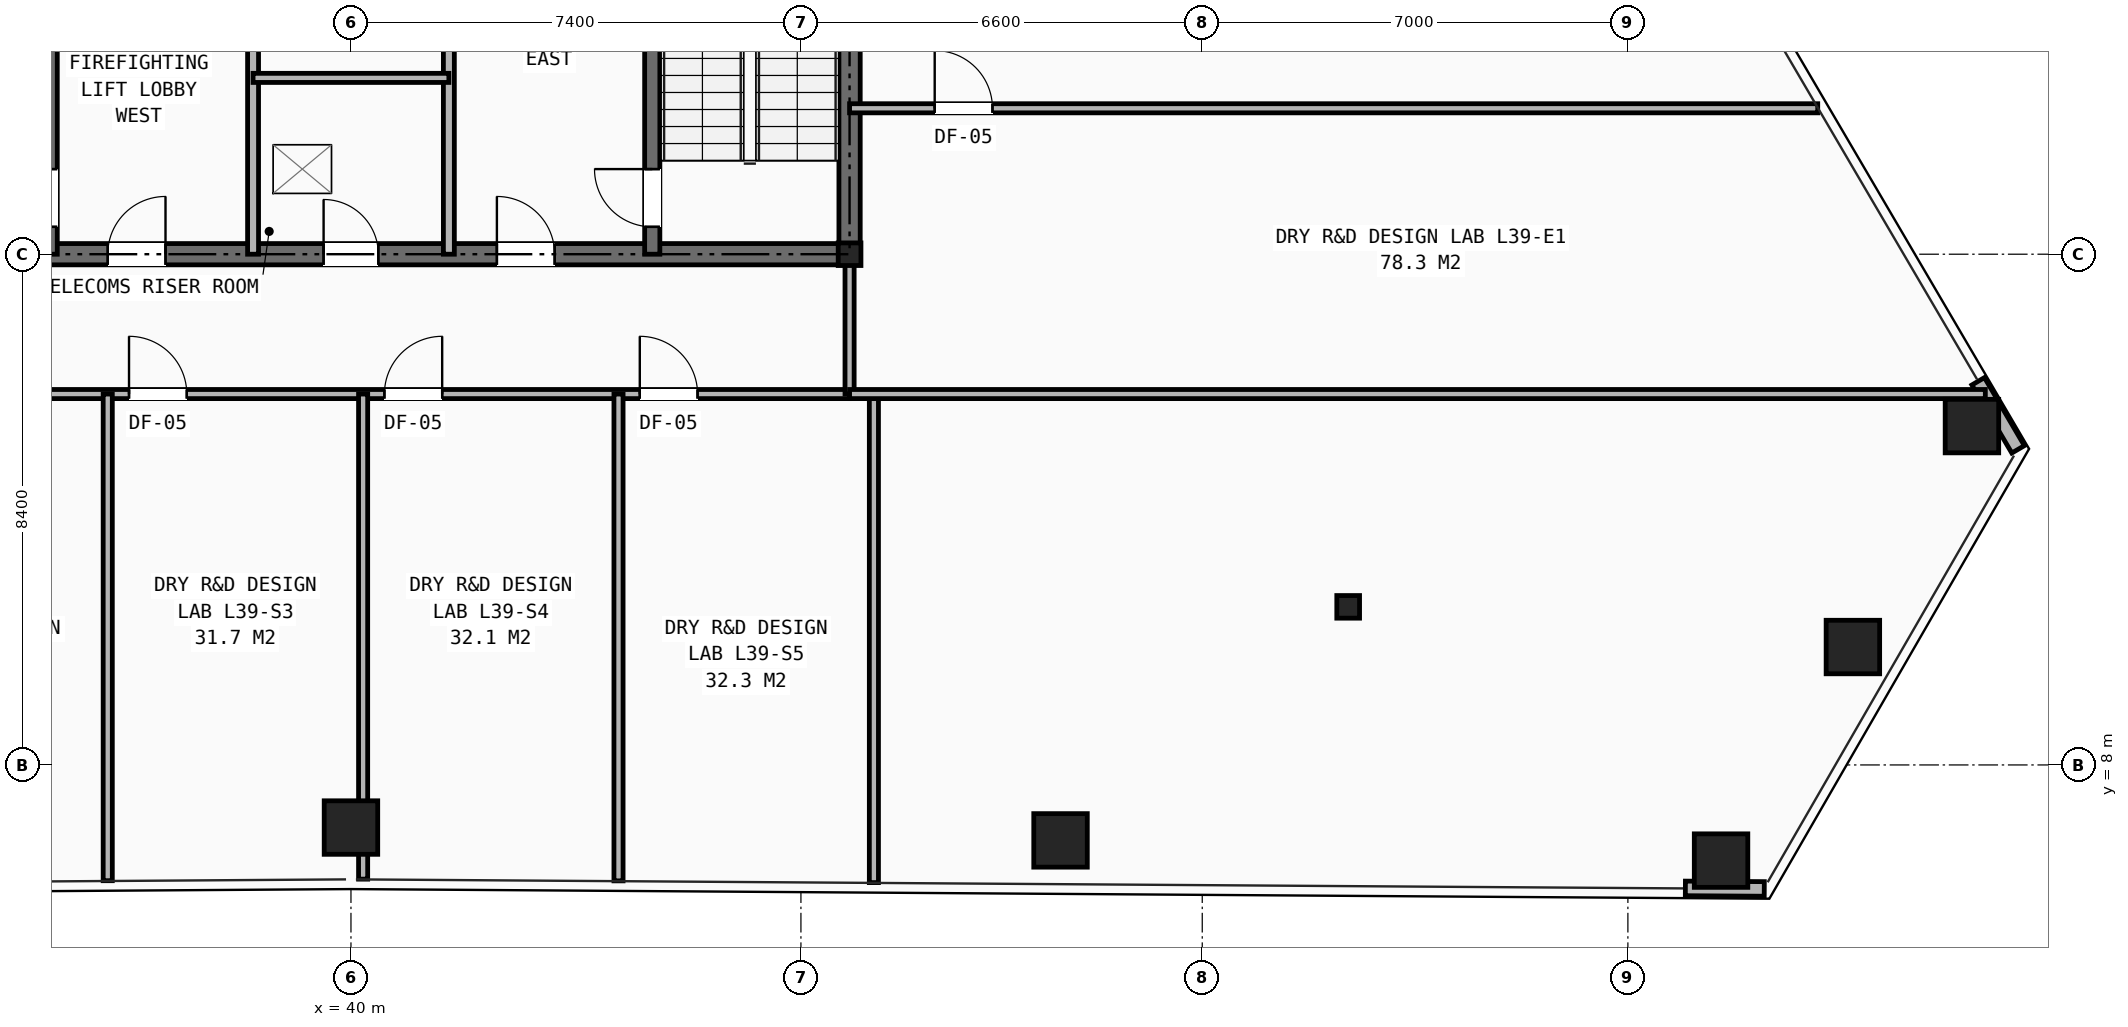
"""IFC4 building model, lengths in metres.
Left out: names, types, materials, properties, quantities, classifications, styles, units other than length and angle.
Written with IfcOpenShell. Run it as: python <this file> out.ifc"""

import sys

from ifc_helpers import new_model, si_unit, direction, frame, frame_2d, origin, origin_2d, place, context, subcontext, project, spatial, rectangle, hollow_rectangle, i_section, extrude, element, fill, save


model = new_model("IFC4")
c1 = context("Model", 3, precision=1e-05, world=origin(), true_north=direction((0.0, 1.0)))
c2 = subcontext(c1, "Body", "Model", "MODEL_VIEW")
j1 = project(units=[si_unit("LENGTHUNIT", "METRE"), si_unit("PLANEANGLEUNIT", "RADIAN")], contexts=[c1])
p1 = place(None, origin())
s1 = spatial("IfcSite", under=j1, at=p1, CompositionType="ELEMENT")
p2 = place(p1, origin())
s2 = spatial("IfcBuilding", under=s1, at=p2, CompositionType="ELEMENT")
p3 = place(p2, frame((0.0, 0.0, 136.7)))
s3 = spatial("IfcBuildingStorey", under=s2, at=p3, CompositionType="ELEMENT", Elevation=136.7)
for number, where, z_axis, x_axis in (
    (1, (48.2, 16.4, 0.0), (0.0, 0.0, 1.0), (1.0, 0.0, 0.0)),
    (2, (56.4, 10.6, 0.0), (0.0, 0.0, 1.0), (1.0, 0.0, 0.0)),
):
    element("IfcColumn", number, at=place(p3, frame(where, z_axis=z_axis, x_axis=x_axis)), inside=s3, PredefinedType="COLUMN", context=c2, shape_type="SweptSolid", body=[
        extrude(i_section(OverallWidth=0.374, OverallDepth=0.372, WebThickness=0.016, FlangeThickness=0.026, at=origin_2d()), origin(), (0.0, 0.0, 1.0), 3.45),
    ])
for number, where, z_axis, x_axis in (
    (3, (40.0, 6.97, 0.0), (0.0, 0.0, 1.0), (1.0, 0.0, 0.0)),
    (4, (51.669, 6.759, 0.0), (0.0, 0.0, 1.0), (1.0, 0.0, 0.0)),
    (5, (62.532, 6.427, 0.0), (0.0, 0.0, 1.0), (1.0, 0.0, 0.0)),
    (6, (64.7, 9.939, 0.0), (0.0, 0.0, 1.0), (1.0, 0.0, 0.0)),
    (7, (66.658, 13.573, 0.0), (0.0, 0.0, 1.0), (1.0, 0.0, 0.0)),
):
    element("IfcColumn", number, at=place(p3, frame(where, z_axis=z_axis, x_axis=x_axis)), inside=s3, PredefinedType="COLUMN", context=c2, shape_type="SweptSolid", body=[
        extrude(hollow_rectangle(XDim=0.88, YDim=0.88, WallThickness=0.06, at=origin_2d()), origin(), (0.0, 0.0, 1.0), 3.45),
    ])
for number, where, z_axis, x_axis in (
    (8, (61.945, 5.969, 0.0), (0.0, 0.0, 1.0), (1.0, -0.007, 0.0)),
    (9, (67.417, 13.191, 0.0), (0.0, 0.0, 1.0), (-0.506, 0.863, 0.0)),
):
    element("IfcWall", number, at=place(p3, frame(where, z_axis=z_axis, x_axis=x_axis)), inside=s3, PredefinedType="SHEAR", context=c2, shape_type="SweptSolid", body=[
        extrude(rectangle(XDim=1.298, YDim=0.24, at=frame_2d((0.649, 0.0))), origin(), (0.0, 0.0, 1.0), 2.583),
    ])
p4 = place(p3, frame((31.8, 16.4, 0.0), z_axis=(0.0, 0.0, 1.0), x_axis=(1.0, 0.0, 0.0)))
e10 = element("IfcWall", 10, at=p4, inside=s3, PredefinedType="SHEAR", context=c2, shape_type="SweptSolid", body=[
    extrude(rectangle(XDim=16.4, YDim=0.35, at=frame_2d((8.2, 0.0))), origin(), (0.0, 0.0, 1.0), 3.21),
])
p5 = place(p4, frame((7.75, 0.0, 0.0)))
e11 = element("IfcOpeningElement", 11, at=p5, cuts=e10, PredefinedType="OPENING", context=c2, shape_type="SweptSolid", body=[
    extrude(rectangle(XDim=0.9, YDim=2.1, at=frame_2d((0.45, 1.05))), frame((0.0, 0.185, 0.0), z_axis=(0.0, -1.0, 0.0), x_axis=(1.0, 0.0, 0.0)), (0.0, 0.0, 1.0), 0.37),
])
p6 = place(p4, frame((4.2, 0.0, 0.0)))
e12 = element("IfcOpeningElement", 12, at=p6, cuts=e10, PredefinedType="OPENING", context=c2, shape_type="SweptSolid", body=[
    extrude(rectangle(XDim=0.95, YDim=2.1, at=frame_2d((0.475, 1.05))), frame((0.0, 0.185, 0.0), z_axis=(0.0, -1.0, 0.0), x_axis=(1.0, 0.0, 0.0)), (0.0, 0.0, 1.0), 0.37),
])
p7 = place(p4, frame((10.6, 0.0, 0.0)))
e13 = element("IfcOpeningElement", 13, at=p7, cuts=e10, PredefinedType="OPENING", context=c2, shape_type="SweptSolid", body=[
    extrude(rectangle(XDim=0.95, YDim=2.1, at=frame_2d((0.475, 1.05))), frame((0.0, 0.185, 0.0), z_axis=(0.0, -1.0, 0.0), x_axis=(1.0, 0.0, 0.0)), (0.0, 0.0, 1.0), 0.37),
])
p8 = place(p3, frame((48.2, 16.4, 0.0), z_axis=(0.0, 0.0, 1.0), x_axis=(0.0, 1.0, 0.0)))
e14 = element("IfcWall", 14, at=p8, inside=s3, PredefinedType="SHEAR", context=c2, shape_type="SweptSolid", body=[
    extrude(rectangle(XDim=14.8, YDim=0.35, at=frame_2d((7.4, 0.0))), origin(), (0.0, 0.0, 1.0), 3.21),
])
p9 = place(p8, frame((11.0, 0.0, 0.0)))
e15 = element("IfcOpeningElement", 15, at=p9, cuts=e14, PredefinedType="OPENING", context=c2, shape_type="SweptSolid", body=[
    extrude(rectangle(XDim=1.1, YDim=2.15, at=frame_2d((0.55, 1.075))), frame((0.0, 0.185, 0.0), z_axis=(0.0, -1.0, 0.0), x_axis=(1.0, 0.0, 0.0)), (0.0, 0.0, 1.0), 0.37),
])
p10 = place(p3, frame((35.045, 16.4, 0.0), z_axis=(0.0, 0.0, 1.0), x_axis=(0.0, 1.0, 0.0)))
e16 = element("IfcWall", 16, at=p10, inside=s3, PredefinedType="SHEAR", context=c2, shape_type="SweptSolid", body=[
    extrude(rectangle(XDim=8.4, YDim=0.25, at=frame_2d((4.2, 0.0))), origin(), (0.0, 0.0, 1.0), 3.21),
])
p11 = place(p10, frame((0.45, 0.0, 0.0)))
e17 = element("IfcOpeningElement", 17, at=p11, cuts=e16, PredefinedType="OPENING", context=c2, shape_type="SweptSolid", body=[
    extrude(rectangle(XDim=0.95, YDim=2.1, at=frame_2d((0.475, 1.05))), frame((0.0, 0.135, 0.0), z_axis=(0.0, -1.0, 0.0), x_axis=(1.0, 0.0, 0.0)), (0.0, 0.0, 1.0), 0.27),
])
p12 = place(p3, frame((44.955, 16.4, 0.0), z_axis=(0.0, 0.0, 1.0), x_axis=(0.0, 1.0, 0.0)))
e18 = element("IfcWall", 18, at=p12, inside=s3, PredefinedType="SHEAR", context=c2, shape_type="SweptSolid", body=[
    extrude(rectangle(XDim=8.4, YDim=0.25, at=frame_2d((4.2, 0.0))), origin(), (0.0, 0.0, 1.0), 3.21),
])
p13 = place(p12, frame((0.45, 0.0, 0.0)))
e19 = element("IfcOpeningElement", 19, at=p13, cuts=e18, PredefinedType="OPENING", context=c2, shape_type="SweptSolid", body=[
    extrude(rectangle(XDim=0.95, YDim=2.1, at=frame_2d((0.475, 1.05))), frame((0.0, 0.135, 0.0), z_axis=(0.0, -1.0, 0.0), x_axis=(1.0, 0.0, 0.0)), (0.0, 0.0, 1.0), 0.27),
])
p14 = place(p3, frame((38.39, 16.4, 0.0), z_axis=(0.0, 0.0, 1.0), x_axis=(0.0, 1.0, 0.0)))
e20 = element("IfcWall", 20, at=p14, inside=s3, PredefinedType="PARTITIONING", context=c2, shape_type="SweptSolid", body=[
    extrude(rectangle(XDim=8.4, YDim=0.18, at=frame_2d((4.2, 0.0))), origin(), (0.0, 0.0, 1.0), 2.661),
])
p15 = place(p14, frame((3.8, 0.0, 0.0)))
e21 = element("IfcOpeningElement", 21, at=p15, cuts=e20, PredefinedType="OPENING", context=c2, shape_type="SweptSolid", body=[
    extrude(rectangle(XDim=0.95, YDim=2.1, at=frame_2d((0.475, 1.05))), frame((0.0, 0.1, 0.0), z_axis=(0.0, -1.0, 0.0), x_axis=(1.0, 0.0, 0.0)), (0.0, 0.0, 1.0), 0.2),
])
p16 = place(p3, frame((41.61, 16.4, 0.0), z_axis=(0.0, 0.0, 1.0), x_axis=(0.0, 1.0, 0.0)))
e22 = element("IfcWall", 22, at=p16, inside=s3, PredefinedType="PARTITIONING", context=c2, shape_type="SweptSolid", body=[
    extrude(rectangle(XDim=8.4, YDim=0.18, at=frame_2d((4.2, 0.0))), origin(), (0.0, 0.0, 1.0), 2.661),
])
p17 = place(p3, frame((38.39, 19.3, 0.0), z_axis=(0.0, 0.0, 1.0), x_axis=(1.0, 0.0, 0.0)))
e23 = element("IfcWall", 23, at=p17, inside=s3, PredefinedType="PARTITIONING", context=c2, shape_type="SweptSolid", body=[
    extrude(rectangle(XDim=3.22, YDim=0.15, at=frame_2d((1.61, 0.0))), origin(), (0.0, 0.0, 1.0), 3.21),
])
p18 = place(p3, frame((29.6, 14.1, 0.0), z_axis=(0.0, 0.0, 1.0), x_axis=(1.0, 0.0, 0.0)))
e24 = element("IfcWall", 24, at=p18, inside=s3, PredefinedType="PARTITIONING", context=c2, shape_type="SweptSolid", body=[
    extrude(rectangle(XDim=18.6, YDim=0.15, at=frame_2d((9.3, 0.0))), origin(), (0.0, 0.0, 1.0), 2.225),
])
p19 = place(p18, frame((0.55, 0.0, 0.0)))
e25 = element("IfcOpeningElement", 25, at=p19, cuts=e24, PredefinedType="OPENING", context=c2, shape_type="SweptSolid", body=[
    extrude(rectangle(XDim=0.95, YDim=2.1, at=frame_2d((0.475, 1.05))), frame((0.0, 0.085, 0.0), z_axis=(0.0, -1.0, 0.0), x_axis=(1.0, 0.0, 0.0)), (0.0, 0.0, 1.0), 0.17),
])
p20 = place(p18, frame((2.55, 0.0, 0.0)))
e26 = element("IfcOpeningElement", 26, at=p20, cuts=e24, PredefinedType="OPENING", context=c2, shape_type="SweptSolid", body=[
    extrude(rectangle(XDim=0.95, YDim=2.1, at=frame_2d((0.475, 1.05))), frame((0.0, 0.085, 0.0), z_axis=(0.0, -1.0, 0.0), x_axis=(1.0, 0.0, 0.0)), (0.0, 0.0, 1.0), 0.17),
])
p21 = place(p18, frame((6.75, 0.0, 0.0)))
e27 = element("IfcOpeningElement", 27, at=p21, cuts=e24, PredefinedType="OPENING", context=c2, shape_type="SweptSolid", body=[
    extrude(rectangle(XDim=0.95, YDim=2.1, at=frame_2d((0.475, 1.05))), frame((0.0, 0.085, 0.0), z_axis=(0.0, -1.0, 0.0), x_axis=(1.0, 0.0, 0.0)), (0.0, 0.0, 1.0), 0.17),
])
p22 = place(p18, frame((10.95, 0.0, 0.0)))
e28 = element("IfcOpeningElement", 28, at=p22, cuts=e24, PredefinedType="OPENING", context=c2, shape_type="SweptSolid", body=[
    extrude(rectangle(XDim=0.95, YDim=2.1, at=frame_2d((0.475, 1.05))), frame((0.0, 0.085, 0.0), z_axis=(0.0, -1.0, 0.0), x_axis=(1.0, 0.0, 0.0)), (0.0, 0.0, 1.0), 0.17),
])
p23 = place(p18, frame((15.15, 0.0, 0.0)))
e29 = element("IfcOpeningElement", 29, at=p23, cuts=e24, PredefinedType="OPENING", context=c2, shape_type="SweptSolid", body=[
    extrude(rectangle(XDim=0.95, YDim=2.1, at=frame_2d((0.475, 1.05))), frame((0.0, 0.085, 0.0), z_axis=(0.0, -1.0, 0.0), x_axis=(1.0, 0.0, 0.0)), (0.0, 0.0, 1.0), 0.17),
])
p24 = place(p3, frame((48.2, 14.1, 0.0), z_axis=(0.0, 0.0, 1.0), x_axis=(0.0, 1.0, 0.0)))
e30 = element("IfcWall", 30, at=p24, inside=s3, PredefinedType="PARTITIONING", context=c2, shape_type="SweptSolid", body=[
    extrude(rectangle(XDim=2.3, YDim=0.15, at=frame_2d((1.15, 0.0))), origin(), (0.0, 0.0, 1.0), 2.661),
])
p25 = place(p3, frame((36.0, 6.096, 0.0), z_axis=(0.0, 0.0, 1.0), x_axis=(0.0, 1.0, 0.0)))
e31 = element("IfcWall", 31, at=p25, inside=s3, PredefinedType="PARTITIONING", context=c2, shape_type="SweptSolid", body=[
    extrude(rectangle(XDim=8.004, YDim=0.15, at=frame_2d((4.002, 0.0))), origin(), (0.0, 0.0, 1.0), 2.225),
])
p26 = place(p3, frame((40.2, 6.122, 0.0), z_axis=(0.0, 0.0, 1.0), x_axis=(0.0, 1.0, 0.0)))
e32 = element("IfcWall", 32, at=p26, inside=s3, PredefinedType="PARTITIONING", context=c2, shape_type="SweptSolid", body=[
    extrude(rectangle(XDim=7.978, YDim=0.15, at=frame_2d((3.989, 0.0))), origin(), (0.0, 0.0, 1.0), 2.225),
])
p27 = place(p3, frame((44.4, 6.094, 0.0), z_axis=(0.0, 0.0, 1.0), x_axis=(0.0, 1.0, 0.0)))
e33 = element("IfcWall", 33, at=p27, inside=s3, PredefinedType="PARTITIONING", context=c2, shape_type="SweptSolid", body=[
    extrude(rectangle(XDim=8.007, YDim=0.15, at=frame_2d((4.003, 0.0))), origin(), (0.0, 0.0, 1.0), 2.589),
])
p28 = place(p3, frame((48.6, 6.065, 0.0), z_axis=(0.0, 0.0, 1.0), x_axis=(0.0, 1.0, 0.0)))
e34 = element("IfcWall", 34, at=p28, inside=s3, PredefinedType="PARTITIONING", context=c2, shape_type="SweptSolid", body=[
    extrude(rectangle(XDim=8.035, YDim=0.15, at=frame_2d((4.018, 0.0))), origin(), (0.0, 0.0, 1.0), 2.589),
])
p29 = place(p3, frame((48.2, 14.1, 0.0), z_axis=(0.0, 0.0, 1.0), x_axis=(1.0, 0.0, 0.0)))
e35 = element("IfcWall", 35, at=p29, inside=s3, PredefinedType="PARTITIONING", context=c2, shape_type="SweptSolid", body=[
    extrude(rectangle(XDim=18.678, YDim=0.15, at=frame_2d((9.339, 0.0))), origin(), (0.0, 0.0, 1.0), 2.589),
])
p30 = place(p3, frame((48.2, 18.8, 0.0), z_axis=(0.0, 0.0, 1.0), x_axis=(1.0, 0.0, 0.0)))
e36 = element("IfcWall", 36, at=p30, inside=s3, PredefinedType="PARTITIONING", context=c2, shape_type="SweptSolid", body=[
    extrude(rectangle(XDim=15.922, YDim=0.15, at=frame_2d((7.961, 0.0))), origin(), (0.0, 0.0, 1.0), 2.589),
])
p31 = place(p30, frame((1.4, 0.0, 0.0)))
e37 = element("IfcOpeningElement", 37, at=p31, cuts=e36, PredefinedType="OPENING", context=c2, shape_type="SweptSolid", body=[
    extrude(rectangle(XDim=0.95, YDim=2.1, at=frame_2d((0.475, 1.05))), frame((0.0, 0.085, 0.0), z_axis=(0.0, -1.0, 0.0), x_axis=(1.0, 0.0, 0.0)), (0.0, 0.0, 1.0), 0.17),
])
p32 = place(p5, origin())
e38 = element("IfcDoor", 38, at=p32, inside=s3, OperationType="SINGLE_SWING_LEFT", PredefinedType="DOOR", context=c2, shape_type="SweptSolid", body=[
    extrude(rectangle(XDim=0.9, YDim=2.1, at=frame_2d((0.45, 1.05))), frame((0.0, 0.025, 0.0), z_axis=(0.0, -1.0, 0.0), x_axis=(1.0, 0.0, 0.0)), (0.0, 0.0, 1.0), 0.05),
])
fill(e11, e38)
p33 = place(p13, origin())
e39 = element("IfcDoor", 39, at=p33, inside=s3, OperationType="SINGLE_SWING_RIGHT", PredefinedType="DOOR", context=c2, shape_type="SweptSolid", body=[
    extrude(rectangle(XDim=0.95, YDim=2.1, at=frame_2d((0.475, 1.05))), frame((0.0, 0.025, 0.0), z_axis=(0.0, -1.0, 0.0), x_axis=(1.0, 0.0, 0.0)), (0.0, 0.0, 1.0), 0.05),
])
fill(e19, e39)
p34 = place(p6, origin())
e40 = element("IfcDoor", 40, at=p34, inside=s3, OperationType="SINGLE_SWING_RIGHT", PredefinedType="DOOR", context=c2, shape_type="SweptSolid", body=[
    extrude(rectangle(XDim=0.95, YDim=2.1, at=frame_2d((0.475, 1.05))), frame((0.0, 0.025, 0.0), z_axis=(0.0, -1.0, 0.0), x_axis=(1.0, 0.0, 0.0)), (0.0, 0.0, 1.0), 0.05),
])
fill(e12, e40)
p35 = place(p7, origin())
e41 = element("IfcDoor", 41, at=p35, inside=s3, OperationType="SINGLE_SWING_LEFT", PredefinedType="DOOR", context=c2, shape_type="SweptSolid", body=[
    extrude(rectangle(XDim=0.95, YDim=2.1, at=frame_2d((0.475, 1.05))), frame((0.0, 0.025, 0.0), z_axis=(0.0, -1.0, 0.0), x_axis=(1.0, 0.0, 0.0)), (0.0, 0.0, 1.0), 0.05),
])
fill(e13, e41)
p36 = place(p21, origin())
e42 = element("IfcDoor", 42, at=p36, inside=s3, OperationType="SINGLE_SWING_LEFT", PredefinedType="DOOR", context=c2, shape_type="SweptSolid", body=[
    extrude(rectangle(XDim=0.95, YDim=2.1, at=frame_2d((0.475, 1.05))), frame((0.0, 0.025, 0.0), z_axis=(0.0, -1.0, 0.0), x_axis=(1.0, 0.0, 0.0)), (0.0, 0.0, 1.0), 0.05),
])
fill(e27, e42)
p37 = place(p22, origin())
e43 = element("IfcDoor", 43, at=p37, inside=s3, OperationType="SINGLE_SWING_RIGHT", PredefinedType="DOOR", context=c2, shape_type="SweptSolid", body=[
    extrude(rectangle(XDim=0.95, YDim=2.1, at=frame_2d((0.475, 1.05))), frame((0.0, 0.025, 0.0), z_axis=(0.0, -1.0, 0.0), x_axis=(1.0, 0.0, 0.0)), (0.0, 0.0, 1.0), 0.05),
])
fill(e28, e43)
p38 = place(p23, origin())
e44 = element("IfcDoor", 44, at=p38, inside=s3, OperationType="SINGLE_SWING_LEFT", PredefinedType="DOOR", context=c2, shape_type="SweptSolid", body=[
    extrude(rectangle(XDim=0.95, YDim=2.1, at=frame_2d((0.475, 1.05))), frame((0.0, 0.025, 0.0), z_axis=(0.0, -1.0, 0.0), x_axis=(1.0, 0.0, 0.0)), (0.0, 0.0, 1.0), 0.05),
])
fill(e29, e44)
p39 = place(p31, origin())
e45 = element("IfcDoor", 45, at=p39, inside=s3, OperationType="SINGLE_SWING_LEFT", PredefinedType="DOOR", context=c2, shape_type="SweptSolid", body=[
    extrude(rectangle(XDim=0.95, YDim=2.1, at=frame_2d((0.475, 1.05))), frame((0.0, 0.025, 0.0), z_axis=(0.0, -1.0, 0.0), x_axis=(1.0, 0.0, 0.0)), (0.0, 0.0, 1.0), 0.05),
])
fill(e37, e45)
save(model, sys.argv[1])
